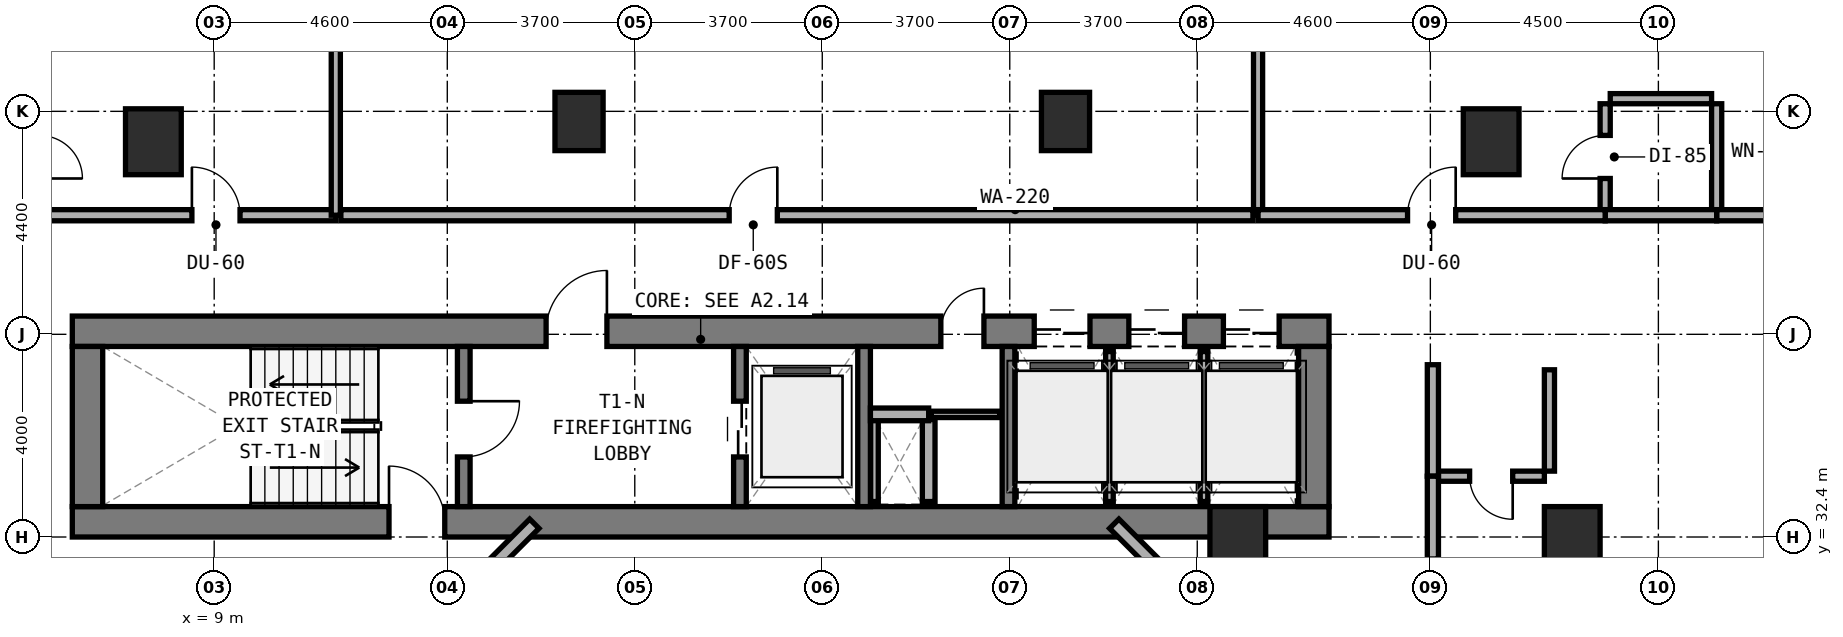
"""IFC4 building model, lengths in metres.
Left out: names, types, materials, properties, quantities, classifications, styles, units other than length and angle.
Written with IfcOpenShell. Run it as: python <this file> out.ifc"""

import sys

from ifc_helpers import new_model, si_unit, direction, frame, frame_2d, origin, origin_2d, place, context, subcontext, project, spatial, rectangle, extrude, element, fill, save


model = new_model("IFC4")
c1 = context("Model", 3, precision=1e-05, world=origin(), true_north=direction((0.0, 1.0)))
c2 = subcontext(c1, "Body", "Model", "MODEL_VIEW")
j1 = project(units=[si_unit("LENGTHUNIT", "METRE"), si_unit("PLANEANGLEUNIT", "RADIAN")], contexts=[c1])
p1 = place(None, origin())
s1 = spatial("IfcSite", under=j1, at=p1, CompositionType="ELEMENT")
p2 = place(p1, origin())
s2 = spatial("IfcBuilding", under=s1, at=p2, CompositionType="ELEMENT")
p3 = place(p2, frame((0.0, 0.0, 52.0)))
s3 = spatial("IfcBuildingStorey", under=s2, at=p3, CompositionType="ELEMENT", Elevation=52.0)
p4 = place(p3, frame((6.2, 32.7, 0.0), z_axis=(0.0, 0.0, 1.0), x_axis=(1.0, 0.0, 0.0)))
e1 = element("IfcWall", 1, at=p4, inside=s3, PredefinedType="SHEAR", context=c2, shape_type="SweptSolid", body=[
    extrude(rectangle(XDim=24.8, YDim=0.6, at=frame_2d((12.4, 0.0))), origin(), (0.0, 0.0, 1.0), 3.5),
])
p5 = place(p4, frame((6.25, 0.0, 0.0)))
e2 = element("IfcOpeningElement", 2, at=p5, cuts=e1, PredefinedType="OPENING", context=c2, shape_type="SweptSolid", body=[
    extrude(rectangle(XDim=1.1, YDim=2.15, at=frame_2d((0.55, 1.075))), frame((0.0, 0.31, 0.0), z_axis=(0.0, -1.0, 0.0), x_axis=(1.0, 0.0, 0.0)), (0.0, 0.0, 1.0), 0.62),
])
p6 = place(p3, frame((6.2, 36.46, 0.0), z_axis=(0.0, 0.0, 1.0), x_axis=(1.0, 0.0, 0.0)))
e3 = element("IfcWall", 3, at=p6, inside=s3, PredefinedType="SHEAR", context=c2, shape_type="SweptSolid", body=[
    extrude(rectangle(XDim=24.8, YDim=0.6, at=frame_2d((12.4, 0.0))), origin(), (0.0, 0.0, 1.0), 3.5),
])
p7 = place(p6, frame((9.35, 0.0, 0.0)))
e4 = element("IfcOpeningElement", 4, at=p7, cuts=e3, PredefinedType="OPENING", context=c2, shape_type="SweptSolid", body=[
    extrude(rectangle(XDim=1.2, YDim=2.15, at=frame_2d((0.6, 1.075))), frame((0.0, 0.31, 0.0), z_axis=(0.0, -1.0, 0.0), x_axis=(1.0, 0.0, 0.0)), (0.0, 0.0, 1.0), 0.62),
])
p8 = place(p6, frame((17.14, 0.0, 0.0)))
e5 = element("IfcOpeningElement", 5, at=p8, cuts=e3, PredefinedType="OPENING", context=c2, shape_type="SweptSolid", body=[
    extrude(rectangle(XDim=0.85, YDim=2.1, at=frame_2d((0.425, 1.05))), frame((0.0, 0.31, 0.0), z_axis=(0.0, -1.0, 0.0), x_axis=(1.0, 0.0, 0.0)), (0.0, 0.0, 1.0), 0.62),
])
p9 = place(p6, frame((18.983, 0.0, 0.0)))
e6 = element("IfcOpeningElement", 6, at=p9, cuts=e3, PredefinedType="OPENING", context=c2, shape_type="SweptSolid", body=[
    extrude(rectangle(XDim=1.1, YDim=2.15, at=frame_2d((0.55, 1.075))), frame((0.0, 0.31, 0.0), z_axis=(0.0, -1.0, 0.0), x_axis=(1.0, 0.0, 0.0)), (0.0, 0.0, 1.0), 0.62),
])
p10 = place(p6, frame((20.85, 0.0, 0.0)))
e7 = element("IfcOpeningElement", 7, at=p10, cuts=e3, PredefinedType="OPENING", context=c2, shape_type="SweptSolid", body=[
    extrude(rectangle(XDim=1.1, YDim=2.15, at=frame_2d((0.55, 1.075))), frame((0.0, 0.31, 0.0), z_axis=(0.0, -1.0, 0.0), x_axis=(1.0, 0.0, 0.0)), (0.0, 0.0, 1.0), 0.62),
])
p11 = place(p6, frame((22.716, 0.0, 0.0)))
e8 = element("IfcOpeningElement", 8, at=p11, cuts=e3, PredefinedType="OPENING", context=c2, shape_type="SweptSolid", body=[
    extrude(rectangle(XDim=1.1, YDim=2.15, at=frame_2d((0.55, 1.075))), frame((0.0, 0.31, 0.0), z_axis=(0.0, -1.0, 0.0), x_axis=(1.0, 0.0, 0.0)), (0.0, 0.0, 1.0), 0.62),
])
for number, where, z_axis, x_axis in (
    (9, (6.5, 33.0, 0.0), (0.0, 0.0, 1.0), (0.0, 1.0, 0.0)),
    (10, (30.7, 33.0, 0.0), (0.0, 0.0, 1.0), (0.0, 1.0, 0.0)),
):
    element("IfcWall", number, at=place(p3, frame(where, z_axis=z_axis, x_axis=x_axis)), inside=s3, PredefinedType="SHEAR", context=c2, shape_type="SweptSolid", body=[
        extrude(rectangle(XDim=3.16, YDim=0.6, at=frame_2d((1.58, 0.0))), origin(), (0.0, 0.0, 1.0), 3.5),
    ])
p12 = place(p3, frame((13.925, 33.0, 0.0), z_axis=(0.0, 0.0, 1.0), x_axis=(0.0, 1.0, 0.0)))
e11 = element("IfcWall", 11, at=p12, inside=s3, PredefinedType="STANDARD", context=c2, shape_type="SweptSolid", body=[
    extrude(rectangle(XDim=3.16, YDim=0.25, at=frame_2d((1.58, 0.0))), origin(), (0.0, 0.0, 1.0), 3.22),
])
p13 = place(p12, frame((0.98, 0.0, 0.0)))
e12 = element("IfcOpeningElement", 12, at=p13, cuts=e11, PredefinedType="OPENING", context=c2, shape_type="SweptSolid", body=[
    extrude(rectangle(XDim=1.1, YDim=2.15, at=frame_2d((0.55, 1.075))), frame((0.0, 0.135, 0.0), z_axis=(0.0, -1.0, 0.0), x_axis=(1.0, 0.0, 0.0)), (0.0, 0.0, 1.0), 0.27),
])
p14 = place(p3, frame((19.375, 33.0, 0.0), z_axis=(0.0, 0.0, 1.0), x_axis=(0.0, 1.0, 0.0)))
e13 = element("IfcWall", 13, at=p14, inside=s3, PredefinedType="STANDARD", context=c2, shape_type="SweptSolid", body=[
    extrude(rectangle(XDim=3.16, YDim=0.25, at=frame_2d((1.58, 0.0))), origin(), (0.0, 0.0, 1.0), 3.22),
])
p15 = place(p14, frame((0.98, 0.0, 0.0)))
e14 = element("IfcOpeningElement", 14, at=p15, cuts=e13, PredefinedType="OPENING", context=c2, shape_type="SweptSolid", body=[
    extrude(rectangle(XDim=1.1, YDim=2.15, at=frame_2d((0.55, 1.075))), frame((0.0, 0.135, 0.0), z_axis=(0.0, -1.0, 0.0), x_axis=(1.0, 0.0, 0.0)), (0.0, 0.0, 1.0), 0.27),
])
for number, where, z_axis, x_axis in (
    (15, (21.825, 33.0, 0.0), (0.0, 0.0, 1.0), (0.0, 1.0, 0.0)),
    (16, (24.675, 33.0, 0.0), (0.0, 0.0, 1.0), (0.0, 1.0, 0.0)),
):
    element("IfcWall", number, at=place(p3, frame(where, z_axis=z_axis, x_axis=x_axis)), inside=s3, PredefinedType="STANDARD", context=c2, shape_type="SweptSolid", body=[
        extrude(rectangle(XDim=3.16, YDim=0.25, at=frame_2d((1.58, 0.0))), origin(), (0.0, 0.0, 1.0), 3.22),
    ])
for number, where, z_axis, x_axis in (
    (17, (16.2, 40.6, 0.0), (0.0, 0.0, 1.0), (1.0, 0.0, 0.0)),
    (18, (25.8, 40.6, 0.0), (0.0, 0.0, 1.0), (1.0, 0.0, 0.0)),
):
    element("IfcColumn", number, at=place(p3, frame(where, z_axis=z_axis, x_axis=x_axis)), inside=s3, PredefinedType="COLUMN", context=c2, shape_type="SweptSolid", body=[
        extrude(rectangle(XDim=0.95, YDim=1.15, at=origin_2d()), origin(), (0.0, 0.0, 1.0), 3.5),
    ])
for number, where, z_axis, x_axis in (
    (19, (34.2, 40.2, 0.0), (0.0, 0.0, 1.0), (1.0, 0.0, 0.0)),
    (20, (7.8, 40.2, 0.0), (0.0, 0.0, 1.0), (1.0, 0.0, 0.0)),
    (21, (35.8, 32.35, 0.0), (0.0, 0.0, 1.0), (1.0, 0.0, 0.0)),
    (22, (29.2, 32.35, 0.0), (0.0, 0.0, 1.0), (1.0, 0.0, 0.0)),
):
    element("IfcColumn", number, at=place(p3, frame(where, z_axis=z_axis, x_axis=x_axis)), inside=s3, PredefinedType="COLUMN", context=c2, shape_type="SweptSolid", body=[
        extrude(rectangle(XDim=1.1, YDim=1.3, at=origin_2d()), origin(), (0.0, 0.0, 1.0), 3.5),
    ])
p16 = place(p3, frame((28.596, 30.828, 0.0), z_axis=(0.0, 0.0, 1.0), x_axis=(-0.707059717605, 0.707153841636, 0.0)))
e23 = element("IfcWall", 23, at=p16, inside=s3, PredefinedType="STANDARD", context=c2, shape_type="SweptSolid", body=[
    extrude(rectangle(XDim=2.594, YDim=0.26, at=frame_2d((1.297, 0.0))), origin(), (0.0, 0.0, 1.0), 3.22),
])
p17 = place(p3, frame((15.318, 32.662, 0.0), z_axis=(0.0, 0.0, 1.0), x_axis=(-0.707106781187, -0.707106781187, 0.0)))
e24 = element("IfcWall", 24, at=p17, inside=s3, PredefinedType="STANDARD", context=c2, shape_type="SweptSolid", body=[
    extrude(rectangle(XDim=2.594, YDim=0.26, at=frame_2d((1.297, 0.0))), origin(), (0.0, 0.0, 1.0), 3.22),
])
p18 = place(p3, frame((22.03, 33.1, 0.0), z_axis=(0.0, 0.0, 1.0), x_axis=(0.0, 1.0, 0.0)))
e25 = element("IfcWall", 25, at=p18, inside=s3, PredefinedType="PARTITIONING", context=c2, shape_type="SweptSolid", body=[
    extrude(rectangle(XDim=1.62, YDim=0.15, at=frame_2d((0.81, 0.0))), origin(), (0.0, 0.0, 1.0), 3.22),
])
p19 = place(p3, frame((23.1, 33.1, 0.0), z_axis=(0.0, 0.0, 1.0), x_axis=(0.0, 1.0, 0.0)))
e26 = element("IfcWall", 26, at=p19, inside=s3, PredefinedType="SOLIDWALL", context=c2, shape_type="SweptSolid", body=[
    extrude(rectangle(XDim=1.62, YDim=0.25, at=frame_2d((0.81, 0.0))), origin(), (0.0, 0.0, 1.0), 3.22),
])
p20 = place(p3, frame((21.95, 34.82, 0.0), z_axis=(0.0, 0.0, 1.0), x_axis=(1.0, 0.0, 0.0)))
e27 = element("IfcWall", 27, at=p20, inside=s3, PredefinedType="SOLIDWALL", context=c2, shape_type="SweptSolid", body=[
    extrude(rectangle(XDim=1.15, YDim=0.25, at=frame_2d((0.575, 0.0))), origin(), (0.0, 0.0, 1.0), 3.22),
])
p21 = place(p3, frame((23.15, 34.82, 0.0), z_axis=(0.0, 0.0, 1.0), x_axis=(1.0, 0.0, 0.0)))
e28 = element("IfcWall", 28, at=p21, inside=s3, PredefinedType="PARTITIONING", context=c2, shape_type="SweptSolid", body=[
    extrude(rectangle(XDim=1.35, YDim=0.125, at=frame_2d((0.675, 0.0))), origin(), (0.0, 0.0, 1.0), 3.22),
])
p22 = place(p3, frame((26.667, 33.1, 0.0), z_axis=(0.0, 0.0, 1.0), x_axis=(0.0, 1.0, 0.0)))
e29 = element("IfcWall", 29, at=p22, inside=s3, PredefinedType="PARTITIONING", context=c2, shape_type="SweptSolid", body=[
    extrude(rectangle(XDim=2.96, YDim=0.15, at=frame_2d((1.48, 0.0))), origin(), (0.0, 0.0, 1.0), 3.22),
])
p23 = place(p3, frame((28.533, 33.1, 0.0), z_axis=(0.0, 0.0, 1.0), x_axis=(0.0, 1.0, 0.0)))
e30 = element("IfcWall", 30, at=p23, inside=s3, PredefinedType="PARTITIONING", context=c2, shape_type="SweptSolid", body=[
    extrude(rectangle(XDim=2.96, YDim=0.15, at=frame_2d((1.48, 0.0))), origin(), (0.0, 0.0, 1.0), 2.395),
])
p24 = place(p3, frame((5.55, 38.75, 0.0), z_axis=(0.0, 0.0, 1.0), x_axis=(1.0, 0.0, 0.0)))
e31 = element("IfcWall", 31, at=p24, inside=s3, PredefinedType="SOLIDWALL", context=c2, shape_type="SweptSolid", body=[
    extrude(rectangle(XDim=5.85, YDim=0.22, at=frame_2d((2.925, 0.0))), origin(), (0.0, 0.0, 1.0), 2.395),
])
p25 = place(p24, frame((3.01, 0.0, 0.0)))
e32 = element("IfcOpeningElement", 32, at=p25, cuts=e31, PredefinedType="OPENING", context=c2, shape_type="SweptSolid", body=[
    extrude(rectangle(XDim=0.95, YDim=2.1, at=frame_2d((0.475, 1.05))), frame((0.0, 0.12, 0.0), z_axis=(0.0, -1.0, 0.0), x_axis=(1.0, 0.0, 0.0)), (0.0, 0.0, 1.0), 0.24),
])
p26 = place(p3, frame((11.4, 38.75, 0.0), z_axis=(0.0, 0.0, 1.0), x_axis=(0.0, 1.0, 0.0)))
e33 = element("IfcWall", 33, at=p26, inside=s3, PredefinedType="SOLIDWALL", context=c2, shape_type="SweptSolid", body=[
    extrude(rectangle(XDim=7.45, YDim=0.18, at=frame_2d((3.725, 0.0))), origin(), (0.0, 0.0, 1.0), 2.745),
])
p27 = place(p3, frame((11.5, 38.75, 0.0), z_axis=(0.0, 0.0, 1.0), x_axis=(1.0, 0.0, 0.0)))
e34 = element("IfcWall", 34, at=p27, inside=s3, PredefinedType="SOLIDWALL", context=c2, shape_type="SweptSolid", body=[
    extrude(rectangle(XDim=18.0, YDim=0.22, at=frame_2d((9.0, 0.0))), origin(), (0.0, 0.0, 1.0), 2.395),
])
p28 = place(p27, frame((7.663, 0.0, 0.0)))
e35 = element("IfcOpeningElement", 35, at=p28, cuts=e34, PredefinedType="OPENING", context=c2, shape_type="SweptSolid", body=[
    extrude(rectangle(XDim=0.95, YDim=2.1, at=frame_2d((0.475, 1.05))), frame((0.0, 0.12, 0.0), z_axis=(0.0, -1.0, 0.0), x_axis=(1.0, 0.0, 0.0)), (0.0, 0.0, 1.0), 0.24),
])
p29 = place(p3, frame((29.6, 38.75, 0.0), z_axis=(0.0, 0.0, 1.0), x_axis=(0.0, 1.0, 0.0)))
e36 = element("IfcWall", 36, at=p29, inside=s3, PredefinedType="SOLIDWALL", context=c2, shape_type="SweptSolid", body=[
    extrude(rectangle(XDim=7.688, YDim=0.18, at=frame_2d((3.844, 0.0))), origin(), (0.0, 0.0, 1.0), 2.745),
])
p30 = place(p3, frame((36.45, 38.85, 0.0), z_axis=(0.0, 0.0, 1.0), x_axis=(0.0, 1.0, 0.0)))
e37 = element("IfcWall", 37, at=p30, inside=s3, PredefinedType="PLUMBINGWALL", context=c2, shape_type="SweptSolid", body=[
    extrude(rectangle(XDim=2.1, YDim=0.2, at=frame_2d((1.05, 0.0))), origin(), (0.0, 0.0, 1.0), 3.22),
])
p31 = place(p30, frame((0.625, 0.0, 0.0)))
e38 = element("IfcOpeningElement", 38, at=p31, cuts=e37, PredefinedType="OPENING", context=c2, shape_type="SweptSolid", body=[
    extrude(rectangle(XDim=0.85, YDim=2.1, at=frame_2d((0.425, 1.05))), frame((0.0, 0.11, 0.0), z_axis=(0.0, -1.0, 0.0), x_axis=(1.0, 0.0, 0.0)), (0.0, 0.0, 1.0), 0.22),
])
p32 = place(p3, frame((36.55, 41.05, 0.0), z_axis=(0.0, 0.0, 1.0), x_axis=(1.0, 0.0, 0.0)))
e39 = element("IfcWall", 39, at=p32, inside=s3, PredefinedType="PLUMBINGWALL", context=c2, shape_type="SweptSolid", body=[
    extrude(rectangle(XDim=2.0, YDim=0.2, at=frame_2d((1.0, 0.0))), origin(), (0.0, 0.0, 1.0), 3.22),
])
p33 = place(p3, frame((38.65, 38.85, 0.0), z_axis=(0.0, 0.0, 1.0), x_axis=(0.0, 1.0, 0.0)))
e40 = element("IfcWall", 40, at=p33, inside=s3, PredefinedType="PLUMBINGWALL", context=c2, shape_type="SweptSolid", body=[
    extrude(rectangle(XDim=2.1, YDim=0.2, at=frame_2d((1.05, 0.0))), origin(), (0.0, 0.0, 1.0), 3.22),
])
p34 = place(p3, frame((38.65, 38.75, 0.0), z_axis=(0.0, 0.0, 1.0), x_axis=(1.0, 0.0, 0.0)))
e41 = element("IfcWall", 41, at=p34, inside=s3, PredefinedType="SOLIDWALL", context=c2, shape_type="SweptSolid", body=[
    extrude(rectangle(XDim=3.19, YDim=0.22, at=frame_2d((1.595, 0.0))), origin(), (0.0, 0.0, 1.0), 3.22),
])
p35 = place(p3, frame((36.45, 38.75, 0.0), z_axis=(0.0, 0.0, 1.0), x_axis=(1.0, 0.0, 0.0)))
e42 = element("IfcWall", 42, at=p35, inside=s3, PredefinedType="SOLIDWALL", context=c2, shape_type="SweptSolid", body=[
    extrude(rectangle(XDim=2.2, YDim=0.22, at=frame_2d((1.1, 0.0))), origin(), (0.0, 0.0, 1.0), 3.22),
])
p36 = place(p3, frame((29.6, 38.75, 0.0), z_axis=(0.0, 0.0, 1.0), x_axis=(1.0, 0.0, 0.0)))
e43 = element("IfcWall", 43, at=p36, inside=s3, PredefinedType="SOLIDWALL", context=c2, shape_type="SweptSolid", body=[
    extrude(rectangle(XDim=6.85, YDim=0.22, at=frame_2d((3.425, 0.0))), origin(), (0.0, 0.0, 1.0), 2.395),
])
p37 = place(p36, frame((2.95, 0.0, 0.0)))
e44 = element("IfcOpeningElement", 44, at=p37, cuts=e43, PredefinedType="OPENING", context=c2, shape_type="SweptSolid", body=[
    extrude(rectangle(XDim=0.95, YDim=2.1, at=frame_2d((0.475, 1.05))), frame((0.0, 0.12, 0.0), z_axis=(0.0, -1.0, 0.0), x_axis=(1.0, 0.0, 0.0)), (0.0, 0.0, 1.0), 0.24),
])
p38 = place(p3, frame((33.15, 33.6, 0.0), z_axis=(0.0, 0.0, 1.0), x_axis=(1.0, 0.0, 0.0)))
e45 = element("IfcWall", 45, at=p38, inside=s3, PredefinedType="PLUMBINGWALL", context=c2, shape_type="SweptSolid", body=[
    extrude(rectangle(XDim=2.1, YDim=0.2, at=frame_2d((1.05, 0.0))), origin(), (0.0, 0.0, 1.0), 3.22),
])
p39 = place(p38, frame((0.625, 0.0, 0.0)))
e46 = element("IfcOpeningElement", 46, at=p39, cuts=e45, PredefinedType="OPENING", context=c2, shape_type="SweptSolid", body=[
    extrude(rectangle(XDim=0.85, YDim=2.1, at=frame_2d((0.425, 1.05))), frame((0.0, 0.11, 0.0), z_axis=(0.0, -1.0, 0.0), x_axis=(1.0, 0.0, 0.0)), (0.0, 0.0, 1.0), 0.22),
])
p40 = place(p3, frame((35.35, 33.7, 0.0), z_axis=(0.0, 0.0, 1.0), x_axis=(0.0, 1.0, 0.0)))
e47 = element("IfcWall", 47, at=p40, inside=s3, PredefinedType="PLUMBINGWALL", context=c2, shape_type="SweptSolid", body=[
    extrude(rectangle(XDim=2.0, YDim=0.2, at=frame_2d((1.0, 0.0))), origin(), (0.0, 0.0, 1.0), 2.745),
])
p41 = place(p3, frame((33.05, 33.6, 0.0), z_axis=(0.0, 0.0, 1.0), x_axis=(0.0, 1.0, 0.0)))
e48 = element("IfcWall", 48, at=p41, inside=s3, PredefinedType="SOLIDWALL", context=c2, shape_type="SweptSolid", body=[
    extrude(rectangle(XDim=2.2, YDim=0.22, at=frame_2d((1.1, 0.0))), origin(), (0.0, 0.0, 1.0), 3.22),
])
p42 = place(p3, frame((33.05, 29.383, 0.0), z_axis=(0.0, 0.0, 1.0), x_axis=(0.0, 1.0, 0.0)))
e49 = element("IfcWall", 49, at=p42, inside=s3, PredefinedType="SOLIDWALL", context=c2, shape_type="SweptSolid", body=[
    extrude(rectangle(XDim=4.217, YDim=0.22, at=frame_2d((2.108, 0.0))), origin(), (0.0, 0.0, 1.0), 2.395),
])
p43 = place(p42, frame((1.634, 0.0, 0.0)))
e50 = element("IfcOpeningElement", 50, at=p43, cuts=e49, PredefinedType="OPENING", context=c2, shape_type="SweptSolid", body=[
    extrude(rectangle(XDim=0.95, YDim=2.1, at=frame_2d((0.475, 1.05))), frame((0.0, 0.12, 0.0), z_axis=(0.0, -1.0, 0.0), x_axis=(1.0, 0.0, 0.0)), (0.0, 0.0, 1.0), 0.24),
])
p44 = place(p13, frame((1.1, 0.0, 0.0), z_axis=(0.0, 0.0, 1.0), x_axis=(-1.0, 0.0, 0.0)))
e51 = element("IfcDoor", 51, at=p44, inside=s3, OperationType="SINGLE_SWING_LEFT", PredefinedType="DOOR", context=c2, shape_type="SweptSolid", body=[
    extrude(rectangle(XDim=1.1, YDim=2.15, at=frame_2d((0.55, 1.075))), frame((0.0, 0.025, 0.0), z_axis=(0.0, -1.0, 0.0), x_axis=(1.0, 0.0, 0.0)), (0.0, 0.0, 1.0), 0.05),
])
fill(e12, e51)
p45 = place(p7, origin())
e52 = element("IfcDoor", 52, at=p45, inside=s3, OperationType="SINGLE_SWING_RIGHT", PredefinedType="DOOR", context=c2, shape_type="SweptSolid", body=[
    extrude(rectangle(XDim=1.2, YDim=2.15, at=frame_2d((0.6, 1.075))), frame((0.0, 0.025, 0.0), z_axis=(0.0, -1.0, 0.0), x_axis=(1.0, 0.0, 0.0)), (0.0, 0.0, 1.0), 0.05),
])
fill(e4, e52)
p46 = place(p15, origin())
e53 = element("IfcDoor", 53, at=p46, inside=s3, OperationType="DOUBLE_DOOR_SLIDING", PredefinedType="DOOR", context=c2, shape_type="SweptSolid", body=[
    extrude(rectangle(XDim=1.1, YDim=2.15, at=frame_2d((0.55, 1.075))), frame((0.0, 0.025, 0.0), z_axis=(0.0, -1.0, 0.0), x_axis=(1.0, 0.0, 0.0)), (0.0, 0.0, 1.0), 0.05),
])
fill(e14, e53)
p47 = place(p8, origin())
e54 = element("IfcDoor", 54, at=p47, inside=s3, OperationType="SINGLE_SWING_RIGHT", PredefinedType="DOOR", context=c2, shape_type="SweptSolid", body=[
    extrude(rectangle(XDim=0.85, YDim=2.1, at=frame_2d((0.425, 1.05))), frame((0.0, 0.025, 0.0), z_axis=(0.0, -1.0, 0.0), x_axis=(1.0, 0.0, 0.0)), (0.0, 0.0, 1.0), 0.05),
])
fill(e5, e54)
p48 = place(p9, origin())
e55 = element("IfcDoor", 55, at=p48, inside=s3, OperationType="DOUBLE_DOOR_SLIDING", PredefinedType="DOOR", context=c2, shape_type="SweptSolid", body=[
    extrude(rectangle(XDim=1.1, YDim=2.15, at=frame_2d((0.55, 1.075))), frame((0.0, 0.025, 0.0), z_axis=(0.0, -1.0, 0.0), x_axis=(1.0, 0.0, 0.0)), (0.0, 0.0, 1.0), 0.05),
])
fill(e6, e55)
p49 = place(p10, origin())
e56 = element("IfcDoor", 56, at=p49, inside=s3, OperationType="DOUBLE_DOOR_SLIDING", PredefinedType="DOOR", context=c2, shape_type="SweptSolid", body=[
    extrude(rectangle(XDim=1.1, YDim=2.15, at=frame_2d((0.55, 1.075))), frame((0.0, 0.025, 0.0), z_axis=(0.0, -1.0, 0.0), x_axis=(1.0, 0.0, 0.0)), (0.0, 0.0, 1.0), 0.05),
])
fill(e7, e56)
p50 = place(p11, origin())
e57 = element("IfcDoor", 57, at=p50, inside=s3, OperationType="DOUBLE_DOOR_SLIDING", PredefinedType="DOOR", context=c2, shape_type="SweptSolid", body=[
    extrude(rectangle(XDim=1.1, YDim=2.15, at=frame_2d((0.55, 1.075))), frame((0.0, 0.025, 0.0), z_axis=(0.0, -1.0, 0.0), x_axis=(1.0, 0.0, 0.0)), (0.0, 0.0, 1.0), 0.05),
])
fill(e8, e57)
p51 = place(p5, origin())
e58 = element("IfcDoor", 58, at=p51, inside=s3, OperationType="SINGLE_SWING_LEFT", PredefinedType="DOOR", context=c2, shape_type="SweptSolid", body=[
    extrude(rectangle(XDim=1.1, YDim=2.15, at=frame_2d((0.55, 1.075))), frame((0.0, 0.025, 0.0), z_axis=(0.0, -1.0, 0.0), x_axis=(1.0, 0.0, 0.0)), (0.0, 0.0, 1.0), 0.05),
])
fill(e2, e58)
p52 = place(p25, origin())
e59 = element("IfcDoor", 59, at=p52, inside=s3, OperationType="SINGLE_SWING_LEFT", PredefinedType="DOOR", context=c2, shape_type="SweptSolid", body=[
    extrude(rectangle(XDim=0.95, YDim=2.1, at=frame_2d((0.475, 1.05))), frame((0.0, 0.025, 0.0), z_axis=(0.0, -1.0, 0.0), x_axis=(1.0, 0.0, 0.0)), (0.0, 0.0, 1.0), 0.05),
])
fill(e32, e59)
p53 = place(p28, origin())
e60 = element("IfcDoor", 60, at=p53, inside=s3, OperationType="SINGLE_SWING_RIGHT", PredefinedType="DOOR", context=c2, shape_type="SweptSolid", body=[
    extrude(rectangle(XDim=0.95, YDim=2.1, at=frame_2d((0.475, 1.05))), frame((0.0, 0.025, 0.0), z_axis=(0.0, -1.0, 0.0), x_axis=(1.0, 0.0, 0.0)), (0.0, 0.0, 1.0), 0.05),
])
fill(e35, e60)
p54 = place(p31, origin())
e61 = element("IfcDoor", 61, at=p54, inside=s3, OperationType="SINGLE_SWING_LEFT", PredefinedType="DOOR", context=c2, shape_type="SweptSolid", body=[
    extrude(rectangle(XDim=0.85, YDim=2.1, at=frame_2d((0.425, 1.05))), frame((0.0, 0.025, 0.0), z_axis=(0.0, -1.0, 0.0), x_axis=(1.0, 0.0, 0.0)), (0.0, 0.0, 1.0), 0.05),
])
fill(e38, e61)
p55 = place(p37, origin())
e62 = element("IfcDoor", 62, at=p55, inside=s3, OperationType="SINGLE_SWING_RIGHT", PredefinedType="DOOR", context=c2, shape_type="SweptSolid", body=[
    extrude(rectangle(XDim=0.95, YDim=2.1, at=frame_2d((0.475, 1.05))), frame((0.0, 0.025, 0.0), z_axis=(0.0, -1.0, 0.0), x_axis=(1.0, 0.0, 0.0)), (0.0, 0.0, 1.0), 0.05),
])
fill(e44, e62)
p56 = place(p39, frame((0.85, 0.0, 0.0), z_axis=(0.0, 0.0, 1.0), x_axis=(-1.0, 0.0, 0.0)))
e63 = element("IfcDoor", 63, at=p56, inside=s3, OperationType="SINGLE_SWING_LEFT", PredefinedType="DOOR", context=c2, shape_type="SweptSolid", body=[
    extrude(rectangle(XDim=0.85, YDim=2.1, at=frame_2d((0.425, 1.05))), frame((0.0, 0.025, 0.0), z_axis=(0.0, -1.0, 0.0), x_axis=(1.0, 0.0, 0.0)), (0.0, 0.0, 1.0), 0.05),
])
fill(e46, e63)
save(model, sys.argv[1])
